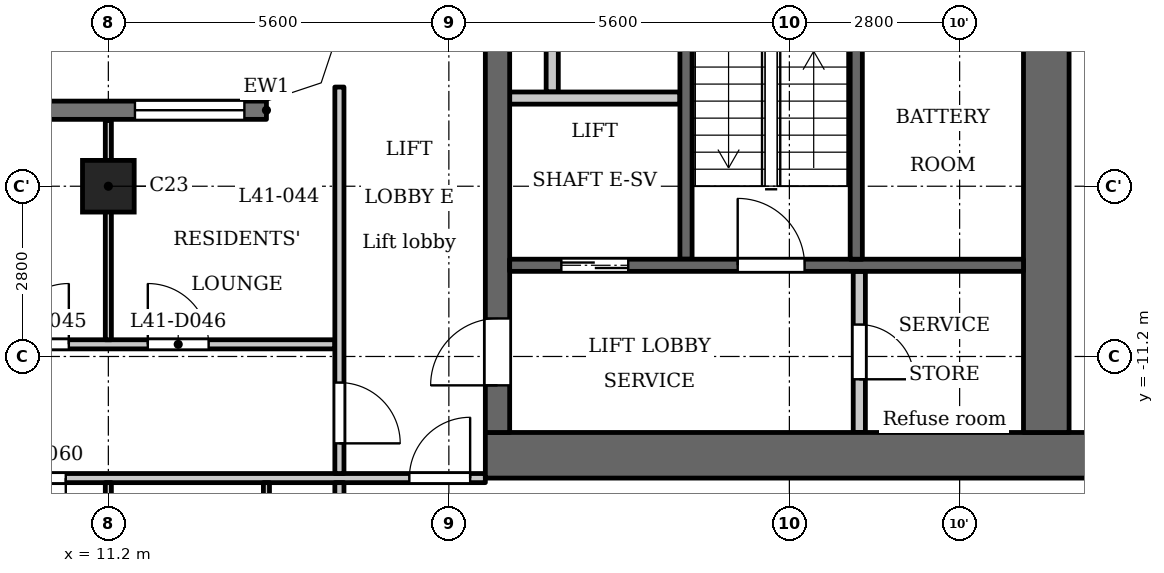
"""IFC4 building model, lengths in metres.
Left out: names, types, materials, properties, quantities, classifications, styles, units other than length and angle.
Written with IfcOpenShell. Run it as: python <this file> out.ifc"""

import sys

from ifc_helpers import new_model, si_unit, direction, frame, frame_2d, origin, origin_2d, place, context, subcontext, project, spatial, polyline, rectangle, outline, extrude, element, fill, save


model = new_model("IFC4")
c1 = context("Model", 3, precision=1e-05, world=origin(), true_north=direction((0.0, 1.0)))
c2 = subcontext(c1, "Body", "Model", "MODEL_VIEW")
j1 = project(units=[si_unit("LENGTHUNIT", "METRE"), si_unit("PLANEANGLEUNIT", "RADIAN")], contexts=[c1])
p1 = place(None, origin())
s1 = spatial("IfcSite", under=j1, at=p1, CompositionType="ELEMENT")
p2 = place(p1, origin())
s2 = spatial("IfcBuilding", under=s1, at=p2, CompositionType="ELEMENT")
p3 = place(p2, frame((0.0, 0.0, 160.6)))
s3 = spatial("IfcBuildingStorey", under=s2, at=p3, CompositionType="ELEMENT", Elevation=160.6)
p4 = place(p3, frame((11.2, -8.4, 0.0), z_axis=(0.0, 0.0, 1.0), x_axis=(1.0, 0.0, 0.0)))
e1 = element("IfcColumn", 1, at=p4, inside=s3, PredefinedType="COLUMN", context=c2, shape_type="SweptSolid", body=[
    extrude(rectangle(XDim=0.85, YDim=0.85, at=origin_2d()), origin(), (0.0, 0.0, 1.0), 3.5),
])
p5 = place(p3, frame((13.8, -7.15, 0.0), z_axis=(0.0, 0.0, 1.0), x_axis=(-1.0, 0.0, 0.0)))
e2 = element("IfcWall", 2, at=p5, inside=s3, PredefinedType="SOLIDWALL", context=c2, shape_type="SweptSolid", body=[
    extrude(rectangle(XDim=27.6, YDim=0.3, at=frame_2d((13.8, 0.0))), origin(), (0.0, 0.0, 1.0), 3.2),
])
p6 = place(p5, frame((0.363, 0.0, 0.9)))
e3 = element("IfcOpeningElement", 3, at=p6, cuts=e2, PredefinedType="OPENING", context=c2, shape_type="SweptSolid", body=[
    extrude(rectangle(XDim=1.8, YDim=1.25, at=frame_2d((0.9, 0.625))), frame((0.0, 0.16, 0.0), z_axis=(0.0, -1.0, 0.0), x_axis=(1.0, 0.0, 0.0)), (0.0, 0.0, 1.0), 0.32),
])
p7 = place(p5, frame((3.6, 0.0, 1.2)))
e4 = element("IfcOpeningElement", 4, at=p7, cuts=e2, PredefinedType="OPENING", context=c2, shape_type="SweptSolid", body=[
    extrude(rectangle(XDim=3.6, YDim=0.95, at=frame_2d((1.8, 0.475))), frame((0.0, 0.16, 0.0), z_axis=(0.0, -1.0, 0.0), x_axis=(1.0, 0.0, 0.0)), (0.0, 0.0, 1.0), 0.32),
])
p8 = place(p5, frame((9.2, 0.0, 1.2)))
e5 = element("IfcOpeningElement", 5, at=p8, cuts=e2, PredefinedType="OPENING", context=c2, shape_type="SweptSolid", body=[
    extrude(rectangle(XDim=3.6, YDim=0.95, at=frame_2d((1.8, 0.475))), frame((0.0, 0.16, 0.0), z_axis=(0.0, -1.0, 0.0), x_axis=(1.0, 0.0, 0.0)), (0.0, 0.0, 1.0), 0.32),
])
p9 = place(p5, frame((14.8, 0.0, 1.2)))
e6 = element("IfcOpeningElement", 6, at=p9, cuts=e2, PredefinedType="OPENING", context=c2, shape_type="SweptSolid", body=[
    extrude(rectangle(XDim=3.6, YDim=0.95, at=frame_2d((1.8, 0.475))), frame((0.0, 0.16, 0.0), z_axis=(0.0, -1.0, 0.0), x_axis=(1.0, 0.0, 0.0)), (0.0, 0.0, 1.0), 0.32),
])
p10 = place(p5, frame((20.4, 0.0, 1.2)))
e7 = element("IfcOpeningElement", 7, at=p10, cuts=e2, PredefinedType="OPENING", context=c2, shape_type="SweptSolid", body=[
    extrude(rectangle(XDim=3.6, YDim=0.95, at=frame_2d((1.8, 0.475))), frame((0.0, 0.16, 0.0), z_axis=(0.0, -1.0, 0.0), x_axis=(1.0, 0.0, 0.0)), (0.0, 0.0, 1.0), 0.32),
])
p11 = place(p5, frame((25.438, 0.0, 0.9)))
e8 = element("IfcOpeningElement", 8, at=p11, cuts=e2, PredefinedType="OPENING", context=c2, shape_type="SweptSolid", body=[
    extrude(rectangle(XDim=1.8, YDim=1.25, at=frame_2d((0.9, 0.625))), frame((0.0, 0.16, 0.0), z_axis=(0.0, -1.0, 0.0), x_axis=(1.0, 0.0, 0.0)), (0.0, 0.0, 1.0), 0.32),
])
p12 = place(p3, frame((20.7, -9.6, 0.0), z_axis=(0.0, 0.0, 1.0), x_axis=(0.0, 1.0, 0.0)))
e9 = element("IfcWall", 9, at=p12, inside=s3, PredefinedType="SHEAR", context=c2, shape_type="SweptSolid", body=[
    extrude(rectangle(XDim=9.75, YDim=0.2, at=frame_2d((4.875, 0.0))), origin(), (0.0, 0.0, 1.0), 3.2),
])
p13 = place(p3, frame((17.4, -12.825, 0.0), z_axis=(0.0, 0.0, 1.0), x_axis=(1.0, 0.0, 0.0)))
e10 = element("IfcWall", 10, at=p13, inside=s3, PredefinedType="SHEAR", context=c2, shape_type="SweptSolid", body=[
    extrude(rectangle(XDim=10.4, YDim=0.75, at=frame_2d((5.2, 0.0))), origin(), (0.0, 0.0, 1.0), 3.2),
])
p14 = place(p3, frame((18.5, -6.85, 0.0), z_axis=(0.0, 0.0, 1.0), x_axis=(0.0, 1.0, 0.0)))
e11 = element("IfcWall", 11, at=p14, inside=s3, PredefinedType="PARTITIONING", context=c2, shape_type="SweptSolid", body=[
    extrude(rectangle(XDim=7.0, YDim=0.2, at=frame_2d((3.5, 0.0))), origin(), (0.0, 0.0, 1.0), 3.2),
])
p15 = place(p3, frame((17.6, -12.45, 0.0), z_axis=(0.0, 0.0, 1.0), x_axis=(0.0, 1.0, 0.0)))
e12 = element("IfcWall", 12, at=p15, inside=s3, PredefinedType="SHEAR", context=c2, shape_type="SweptSolid", body=[
    extrude(rectangle(XDim=24.9, YDim=0.4, at=frame_2d((12.45, 0.0))), origin(), (0.0, 0.0, 1.0), 3.2),
])
p16 = place(p15, frame((8.65, 0.0, 0.0)))
e13 = element("IfcOpeningElement", 13, at=p16, cuts=e12, PredefinedType="OPENING", context=c2, shape_type="SweptSolid", body=[
    extrude(rectangle(XDim=0.9, YDim=2.1, at=frame_2d((0.45, 1.05))), frame((0.0, 0.21, 0.0), z_axis=(0.0, -1.0, 0.0), x_axis=(1.0, 0.0, 0.0)), (0.0, 0.0, 1.0), 0.42),
])
p17 = place(p15, frame((15.6, 0.0, 0.0)))
e14 = element("IfcOpeningElement", 14, at=p17, cuts=e12, PredefinedType="OPENING", context=c2, shape_type="SweptSolid", body=[
    extrude(rectangle(XDim=1.1, YDim=2.1, at=frame_2d((0.55, 1.05))), frame((0.0, 0.21, 0.0), z_axis=(0.0, -1.0, 0.0), x_axis=(1.0, 0.0, 0.0)), (0.0, 0.0, 1.0), 0.42),
])
p18 = place(p15, frame((18.0, 0.0, 0.0)))
e15 = element("IfcOpeningElement", 15, at=p18, cuts=e12, PredefinedType="OPENING", context=c2, shape_type="SweptSolid", body=[
    extrude(rectangle(XDim=1.1, YDim=2.1, at=frame_2d((0.55, 1.05))), frame((0.0, 0.21, 0.0), z_axis=(0.0, -1.0, 0.0), x_axis=(1.0, 0.0, 0.0)), (0.0, 0.0, 1.0), 0.42),
])
p19 = place(p15, frame((23.025, 0.0, 0.0)))
e16 = element("IfcOpeningElement", 16, at=p19, cuts=e12, PredefinedType="OPENING", context=c2, shape_type="SweptSolid", body=[
    extrude(rectangle(XDim=1.1, YDim=2.1, at=frame_2d((0.55, 1.05))), frame((0.0, 0.21, 0.0), z_axis=(0.0, -1.0, 0.0), x_axis=(1.0, 0.0, 0.0)), (0.0, 0.0, 1.0), 0.42),
])
p20 = place(p15, frame((0.775, 0.0, 0.0)))
e17 = element("IfcOpeningElement", 17, at=p20, cuts=e12, PredefinedType="OPENING", context=c2, shape_type="SweptSolid", body=[
    extrude(rectangle(XDim=1.1, YDim=2.1, at=frame_2d((0.55, 1.05))), frame((0.0, 0.21, 0.0), z_axis=(0.0, -1.0, 0.0), x_axis=(1.0, 0.0, 0.0)), (0.0, 0.0, 1.0), 0.42),
])
p21 = place(p15, frame((12.925, 0.0, 0.0)))
e18 = element("IfcOpeningElement", 18, at=p21, cuts=e12, PredefinedType="OPENING", context=c2, shape_type="SweptSolid", body=[
    extrude(rectangle(XDim=1.8, YDim=2.1, at=frame_2d((0.9, 1.05))), frame((0.0, 0.21, 0.0), z_axis=(0.0, -1.0, 0.0), x_axis=(1.0, 0.0, 0.0)), (0.0, 0.0, 1.0), 0.42),
])
p22 = place(p3, frame((26.625, -12.45, 0.0), z_axis=(0.0, 0.0, 1.0), x_axis=(0.0, 1.0, 0.0)))
e19 = element("IfcWall", 19, at=p22, inside=s3, PredefinedType="SHEAR", context=c2, shape_type="SweptSolid", body=[
    extrude(rectangle(XDim=24.9, YDim=0.75, at=frame_2d((12.45, 0.0))), origin(), (0.0, 0.0, 1.0), 3.2),
])
p23 = place(p3, frame((23.55, -12.45, 0.0), z_axis=(0.0, 0.0, 1.0), x_axis=(0.0, 1.0, 0.0)))
e20 = element("IfcWall", 20, at=p23, inside=s3, PredefinedType="PARTITIONING", context=c2, shape_type="SweptSolid", body=[
    extrude(rectangle(XDim=2.65, YDim=0.2, at=frame_2d((1.325, 0.0))), origin(), (0.0, 0.0, 1.0), 3.2),
])
p24 = place(p23, frame((0.875, 0.0, 0.0)))
e21 = element("IfcOpeningElement", 21, at=p24, cuts=e20, PredefinedType="OPENING", context=c2, shape_type="SweptSolid", body=[
    extrude(rectangle(XDim=0.9, YDim=2.1, at=frame_2d((0.45, 1.05))), frame((0.0, 0.11, 0.0), z_axis=(0.0, -1.0, 0.0), x_axis=(1.0, 0.0, 0.0)), (0.0, 0.0, 1.0), 0.22),
])
p25 = place(p3, frame((17.8, -9.7, 0.0), z_axis=(0.0, 0.0, 1.0), x_axis=(1.0, 0.0, 0.0)))
e22 = element("IfcWall", 22, at=p25, inside=s3, PredefinedType="SHEAR", context=c2, shape_type="SweptSolid", body=[
    extrude(rectangle(XDim=8.45, YDim=0.2, at=frame_2d((4.225, 0.0))), origin(), (0.0, 0.0, 1.0), 3.2),
])
p26 = place(p25, frame((0.85, 0.0, 0.0)))
e23 = element("IfcOpeningElement", 23, at=p26, cuts=e22, PredefinedType="OPENING", context=c2, shape_type="SweptSolid", body=[
    extrude(rectangle(XDim=1.1, YDim=2.1, at=frame_2d((0.55, 1.05))), frame((0.0, 0.11, 0.0), z_axis=(0.0, -1.0, 0.0), x_axis=(1.0, 0.0, 0.0)), (0.0, 0.0, 1.0), 0.22),
])
p27 = place(p25, frame((3.75, 0.0, 0.0)))
e24 = element("IfcOpeningElement", 24, at=p27, cuts=e22, PredefinedType="OPENING", context=c2, shape_type="SweptSolid", body=[
    extrude(rectangle(XDim=1.1, YDim=2.1, at=frame_2d((0.55, 1.05))), frame((0.0, 0.11, 0.0), z_axis=(0.0, -1.0, 0.0), x_axis=(1.0, 0.0, 0.0)), (0.0, 0.0, 1.0), 0.22),
])
p28 = place(p3, frame((17.8, -6.95, 0.0), z_axis=(0.0, 0.0, 1.0), x_axis=(1.0, 0.0, 0.0)))
e25 = element("IfcWall", 25, at=p28, inside=s3, PredefinedType="PARTITIONING", context=c2, shape_type="SweptSolid", body=[
    extrude(rectangle(XDim=2.8, YDim=0.2, at=frame_2d((1.4, 0.0))), origin(), (0.0, 0.0, 1.0), 3.2),
])
p29 = place(p3, frame((23.5, -9.6, 0.0), z_axis=(0.0, 0.0, 1.0), x_axis=(0.0, 1.0, 0.0)))
e26 = element("IfcWall", 26, at=p29, inside=s3, PredefinedType="SHEAR", context=c2, shape_type="SweptSolid", body=[
    extrude(rectangle(XDim=6.9, YDim=0.2, at=frame_2d((3.45, 0.0))), origin(), (0.0, 0.0, 1.0), 3.2),
])
p30 = place(p3, frame((-17.4, -13.2, 0.0), z_axis=(0.0, 0.0, 1.0), x_axis=(1.0, 0.0, 0.0)))
e27 = element("IfcWall", 27, at=p30, inside=s3, PredefinedType="PARTITIONING", context=c2, shape_type="SweptSolid", body=[
    extrude(rectangle(XDim=34.8, YDim=0.15, at=frame_2d((17.4, 0.0))), origin(), (0.0, 0.0, 1.0), 3.2),
])
p31 = place(p30, frame((0.15, 0.0, 0.0)))
e28 = element("IfcOpeningElement", 28, at=p31, cuts=e27, PredefinedType="OPENING", context=c2, shape_type="SweptSolid", body=[
    extrude(rectangle(XDim=1.0, YDim=2.1, at=frame_2d((0.5, 1.05))), frame((0.0, 0.085, 0.0), z_axis=(0.0, -1.0, 0.0), x_axis=(1.0, 0.0, 0.0)), (0.0, 0.0, 1.0), 0.17),
])
p32 = place(p30, frame((33.55, 0.0, 0.0)))
e29 = element("IfcOpeningElement", 29, at=p32, cuts=e27, PredefinedType="OPENING", context=c2, shape_type="SweptSolid", body=[
    extrude(rectangle(XDim=1.0, YDim=2.1, at=frame_2d((0.5, 1.05))), frame((0.0, 0.085, 0.0), z_axis=(0.0, -1.0, 0.0), x_axis=(1.0, 0.0, 0.0)), (0.0, 0.0, 1.0), 0.17),
])
p33 = place(p30, frame((3.5, 0.0, 0.0)))
e30 = element("IfcOpeningElement", 30, at=p33, cuts=e27, PredefinedType="OPENING", context=c2, shape_type="SweptSolid", body=[
    extrude(rectangle(XDim=1.0, YDim=2.1, at=frame_2d((0.5, 1.05))), frame((0.0, 0.085, 0.0), z_axis=(0.0, -1.0, 0.0), x_axis=(1.0, 0.0, 0.0)), (0.0, 0.0, 1.0), 0.17),
])
p34 = place(p30, frame((10.1, 0.0, 0.0)))
e31 = element("IfcOpeningElement", 31, at=p34, cuts=e27, PredefinedType="OPENING", context=c2, shape_type="SweptSolid", body=[
    extrude(rectangle(XDim=1.0, YDim=2.1, at=frame_2d((0.5, 1.05))), frame((0.0, 0.085, 0.0), z_axis=(0.0, -1.0, 0.0), x_axis=(1.0, 0.0, 0.0)), (0.0, 0.0, 1.0), 0.17),
])
p35 = place(p30, frame((15.7, 0.0, 0.0)))
e32 = element("IfcOpeningElement", 32, at=p35, cuts=e27, PredefinedType="OPENING", context=c2, shape_type="SweptSolid", body=[
    extrude(rectangle(XDim=1.0, YDim=2.1, at=frame_2d((0.5, 1.05))), frame((0.0, 0.085, 0.0), z_axis=(0.0, -1.0, 0.0), x_axis=(1.0, 0.0, 0.0)), (0.0, 0.0, 1.0), 0.17),
])
p36 = place(p30, frame((18.05, 0.0, 0.0)))
e33 = element("IfcOpeningElement", 33, at=p36, cuts=e27, PredefinedType="OPENING", context=c2, shape_type="SweptSolid", body=[
    extrude(rectangle(XDim=1.0, YDim=2.1, at=frame_2d((0.5, 1.05))), frame((0.0, 0.085, 0.0), z_axis=(0.0, -1.0, 0.0), x_axis=(1.0, 0.0, 0.0)), (0.0, 0.0, 1.0), 0.17),
])
p37 = place(p30, frame((26.9, 0.0, 0.0)))
e34 = element("IfcOpeningElement", 34, at=p37, cuts=e27, PredefinedType="OPENING", context=c2, shape_type="SweptSolid", body=[
    extrude(rectangle(XDim=1.0, YDim=2.1, at=frame_2d((0.5, 1.05))), frame((0.0, 0.085, 0.0), z_axis=(0.0, -1.0, 0.0), x_axis=(1.0, 0.0, 0.0)), (0.0, 0.0, 1.0), 0.17),
])
p38 = place(p3, frame((-14.925, -11.0, 0.0), z_axis=(0.0, 0.0, 1.0), x_axis=(1.0, 0.0, 0.0)))
e35 = element("IfcWall", 35, at=p38, inside=s3, PredefinedType="PARTITIONING", context=c2, shape_type="SweptSolid", body=[
    extrude(rectangle(XDim=29.85, YDim=0.15, at=frame_2d((14.925, 0.0))), origin(), (0.0, 0.0, 1.0), 3.2),
])
p39 = place(p38, frame((2.075, 0.0, 0.0)))
e36 = element("IfcOpeningElement", 36, at=p39, cuts=e35, PredefinedType="OPENING", context=c2, shape_type="SweptSolid", body=[
    extrude(rectangle(XDim=1.0, YDim=2.1, at=frame_2d((0.5, 1.05))), frame((0.0, 0.085, 0.0), z_axis=(0.0, -1.0, 0.0), x_axis=(1.0, 0.0, 0.0)), (0.0, 0.0, 1.0), 0.17),
])
p40 = place(p38, frame((4.425, 0.0, 0.0)))
e37 = element("IfcOpeningElement", 37, at=p40, cuts=e35, PredefinedType="OPENING", context=c2, shape_type="SweptSolid", body=[
    extrude(rectangle(XDim=1.0, YDim=2.1, at=frame_2d((0.5, 1.05))), frame((0.0, 0.085, 0.0), z_axis=(0.0, -1.0, 0.0), x_axis=(1.0, 0.0, 0.0)), (0.0, 0.0, 1.0), 0.17),
])
p41 = place(p38, frame((13.275, 0.0, 0.0)))
e38 = element("IfcOpeningElement", 38, at=p41, cuts=e35, PredefinedType="OPENING", context=c2, shape_type="SweptSolid", body=[
    extrude(rectangle(XDim=1.0, YDim=2.1, at=frame_2d((0.5, 1.05))), frame((0.0, 0.085, 0.0), z_axis=(0.0, -1.0, 0.0), x_axis=(1.0, 0.0, 0.0)), (0.0, 0.0, 1.0), 0.17),
])
p42 = place(p38, frame((15.625, 0.0, 0.0)))
e39 = element("IfcOpeningElement", 39, at=p42, cuts=e35, PredefinedType="OPENING", context=c2, shape_type="SweptSolid", body=[
    extrude(rectangle(XDim=1.0, YDim=2.1, at=frame_2d((0.5, 1.05))), frame((0.0, 0.085, 0.0), z_axis=(0.0, -1.0, 0.0), x_axis=(1.0, 0.0, 0.0)), (0.0, 0.0, 1.0), 0.17),
])
p43 = place(p38, frame((24.475, 0.0, 0.0)))
e40 = element("IfcOpeningElement", 40, at=p43, cuts=e35, PredefinedType="OPENING", context=c2, shape_type="SweptSolid", body=[
    extrude(rectangle(XDim=1.0, YDim=2.1, at=frame_2d((0.5, 1.05))), frame((0.0, 0.085, 0.0), z_axis=(0.0, -1.0, 0.0), x_axis=(1.0, 0.0, 0.0)), (0.0, 0.0, 1.0), 0.17),
])
p44 = place(p38, frame((26.774, 0.0, 0.0)))
e41 = element("IfcOpeningElement", 41, at=p44, cuts=e35, PredefinedType="OPENING", context=c2, shape_type="SweptSolid", body=[
    extrude(rectangle(XDim=1.0, YDim=2.1, at=frame_2d((0.5, 1.05))), frame((0.0, 0.085, 0.0), z_axis=(0.0, -1.0, 0.0), x_axis=(1.0, 0.0, 0.0)), (0.0, 0.0, 1.0), 0.17),
])
p45 = place(p3, frame((11.2, -17.05, 0.0), z_axis=(0.0, 0.0, 1.0), x_axis=(0.0, 1.0, 0.0)))
e42 = element("IfcWall", 42, at=p45, inside=s3, PredefinedType="PARTITIONING", context=c2, shape_type="SweptSolid", body=[
    extrude(rectangle(XDim=3.775, YDim=0.1, at=frame_2d((1.888, 0.0))), origin(), (0.0, 0.0, 1.0), 3.2),
])
p46 = place(p45, frame((0.1, 0.0, 0.0)))
e43 = element("IfcOpeningElement", 43, at=p46, cuts=e42, PredefinedType="OPENING", context=c2, shape_type="SweptSolid", body=[
    extrude(rectangle(XDim=0.9, YDim=2.1, at=frame_2d((0.45, 1.05))), frame((0.0, 0.06, 0.0), z_axis=(0.0, -1.0, 0.0), x_axis=(1.0, 0.0, 0.0)), (0.0, 0.0, 1.0), 0.12),
])
p47 = place(p3, frame((11.2, -10.925, 0.0), z_axis=(0.0, 0.0, 1.0), x_axis=(0.0, 1.0, 0.0)))
e44 = element("IfcWall", 44, at=p47, inside=s3, PredefinedType="PARTITIONING", context=c2, shape_type="SweptSolid", body=[
    extrude(rectangle(XDim=3.605, YDim=0.1, at=frame_2d((1.802, 0.0))), origin(), (0.0, 0.0, 1.0), 3.2),
])
p48 = place(p3, frame((13.8, -17.05, 0.0), z_axis=(0.0, 0.0, 1.0), x_axis=(0.0, 1.0, 0.0)))
e45 = element("IfcWall", 45, at=p48, inside=s3, PredefinedType="PARTITIONING", context=c2, shape_type="SweptSolid", body=[
    extrude(rectangle(XDim=3.775, YDim=0.1, at=frame_2d((1.888, 0.0))), origin(), (0.0, 0.0, 1.0), 3.2),
])
p49 = place(p3, frame((15.0, -15.325, 0.0), z_axis=(0.0, 0.0, 1.0), x_axis=(0.0, 1.0, 0.0)))
e46 = element("IfcWall", 46, at=p49, inside=s3, PredefinedType="PARTITIONING", context=c2, shape_type="SweptSolid", body=[
    extrude(rectangle(XDim=2.05, YDim=0.15, at=frame_2d((1.025, 0.0))), origin(), (0.0, 0.0, 1.0), 3.2),
])
p50 = place(p3, frame((15.0, -13.125, 0.0), z_axis=(0.0, 0.0, 1.0), x_axis=(0.0, 1.0, 0.0)))
e47 = element("IfcWall", 47, at=p50, inside=s3, PredefinedType="PARTITIONING", context=c2, shape_type="SweptSolid", body=[
    extrude(rectangle(XDim=6.356, YDim=0.15, at=frame_2d((3.178, 0.0))), origin(), (0.0, 0.0, 1.0), 3.2),
])
p51 = place(p50, frame((0.496, 0.0, 0.0)))
e48 = element("IfcOpeningElement", 48, at=p51, cuts=e47, PredefinedType="OPENING", context=c2, shape_type="SweptSolid", body=[
    extrude(rectangle(XDim=1.0, YDim=2.1, at=frame_2d((0.5, 1.05))), frame((0.0, 0.085, 0.0), z_axis=(0.0, -1.0, 0.0), x_axis=(1.0, 0.0, 0.0)), (0.0, 0.0, 1.0), 0.17),
])
p52 = place(p3, origin())
e49 = element("IfcWall", 49, at=p52, inside=s3, PredefinedType="SOLIDWALL", context=c2, shape_type="SweptSolid", body=[
    extrude(outline(polyline([(14.937, -6.937), (15.3, -5.849), (15.3, -5.8), (15.0, -5.8), (14.7, -6.7), (13.8, -7.0), (13.8, -7.3), (13.849, -7.3), (14.937, -6.937)])), origin(), (0.0, 0.0, 1.0), 3.2),
])
p53 = place(p26, origin())
e50 = element("IfcDoor", 50, at=p53, inside=s3, OperationType="DOUBLE_DOOR_SLIDING", PredefinedType="DOOR", context=c2, shape_type="SweptSolid", body=[
    extrude(rectangle(XDim=1.1, YDim=2.1, at=frame_2d((0.55, 1.05))), frame((0.0, 0.025, 0.0), z_axis=(0.0, -1.0, 0.0), x_axis=(1.0, 0.0, 0.0)), (0.0, 0.0, 1.0), 0.05),
])
fill(e23, e50)
p54 = place(p20, origin())
e51 = element("IfcDoor", 51, at=p54, inside=s3, OperationType="SINGLE_SWING_RIGHT", PredefinedType="DOOR", context=c2, shape_type="SweptSolid", body=[
    extrude(rectangle(XDim=1.1, YDim=2.1, at=frame_2d((0.55, 1.05))), frame((0.0, 0.025, 0.0), z_axis=(0.0, -1.0, 0.0), x_axis=(1.0, 0.0, 0.0)), (0.0, 0.0, 1.0), 0.05),
])
fill(e17, e51)
p55 = place(p24, origin())
e52 = element("IfcDoor", 52, at=p55, inside=s3, OperationType="SINGLE_SWING_LEFT", PredefinedType="DOOR", context=c2, shape_type="SweptSolid", body=[
    extrude(rectangle(XDim=0.9, YDim=2.1, at=frame_2d((0.45, 1.05))), frame((0.0, 0.025, 0.0), z_axis=(0.0, -1.0, 0.0), x_axis=(1.0, 0.0, 0.0)), (0.0, 0.0, 1.0), 0.05),
])
fill(e21, e52)
p56 = place(p27, origin())
e53 = element("IfcDoor", 53, at=p56, inside=s3, OperationType="SINGLE_SWING_RIGHT", PredefinedType="DOOR", context=c2, shape_type="SweptSolid", body=[
    extrude(rectangle(XDim=1.1, YDim=2.1, at=frame_2d((0.55, 1.05))), frame((0.0, 0.025, 0.0), z_axis=(0.0, -1.0, 0.0), x_axis=(1.0, 0.0, 0.0)), (0.0, 0.0, 1.0), 0.05),
])
fill(e24, e53)
p57 = place(p51, origin())
e54 = element("IfcDoor", 54, at=p57, inside=s3, OperationType="SINGLE_SWING_LEFT", PredefinedType="DOOR", context=c2, shape_type="SweptSolid", body=[
    extrude(rectangle(XDim=1.0, YDim=2.1, at=frame_2d((0.5, 1.05))), frame((0.0, 0.025, 0.0), z_axis=(0.0, -1.0, 0.0), x_axis=(1.0, 0.0, 0.0)), (0.0, 0.0, 1.0), 0.05),
])
fill(e48, e54)
p58 = place(p32, origin())
e55 = element("IfcDoor", 55, at=p58, inside=s3, OperationType="SINGLE_SWING_LEFT", PredefinedType="DOOR", context=c2, shape_type="SweptSolid", body=[
    extrude(rectangle(XDim=1.0, YDim=2.1, at=frame_2d((0.5, 1.05))), frame((0.0, 0.025, 0.0), z_axis=(0.0, -1.0, 0.0), x_axis=(1.0, 0.0, 0.0)), (0.0, 0.0, 1.0), 0.05),
])
fill(e29, e55)
p59 = place(p43, origin())
e56 = element("IfcDoor", 56, at=p59, inside=s3, OperationType="SINGLE_SWING_LEFT", PredefinedType="DOOR", context=c2, shape_type="SweptSolid", body=[
    extrude(rectangle(XDim=1.0, YDim=2.1, at=frame_2d((0.5, 1.05))), frame((0.0, 0.025, 0.0), z_axis=(0.0, -1.0, 0.0), x_axis=(1.0, 0.0, 0.0)), (0.0, 0.0, 1.0), 0.05),
])
fill(e40, e56)
p60 = place(p44, origin())
e57 = element("IfcDoor", 57, at=p60, inside=s3, OperationType="SINGLE_SWING_RIGHT", PredefinedType="DOOR", context=c2, shape_type="SweptSolid", body=[
    extrude(rectangle(XDim=1.0, YDim=2.1, at=frame_2d((0.5, 1.05))), frame((0.0, 0.025, 0.0), z_axis=(0.0, -1.0, 0.0), x_axis=(1.0, 0.0, 0.0)), (0.0, 0.0, 1.0), 0.05),
])
fill(e41, e57)
p61 = place(p37, origin())
e58 = element("IfcDoor", 58, at=p61, inside=s3, OperationType="SINGLE_SWING_RIGHT", PredefinedType="DOOR", context=c2, shape_type="SweptSolid", body=[
    extrude(rectangle(XDim=1.0, YDim=2.1, at=frame_2d((0.5, 1.05))), frame((0.0, 0.025, 0.0), z_axis=(0.0, -1.0, 0.0), x_axis=(1.0, 0.0, 0.0)), (0.0, 0.0, 1.0), 0.05),
])
fill(e34, e58)
p62 = place(p6, origin())
e59 = element("IfcWindow", 59, at=p62, inside=s3, PartitioningType="SINGLE_PANEL", PredefinedType="WINDOW", context=c2, shape_type="SweptSolid", body=[
    extrude(rectangle(XDim=1.8, YDim=1.25, at=frame_2d((0.9, 0.625))), frame((0.0, 0.03, 0.0), z_axis=(0.0, -1.0, 0.0), x_axis=(1.0, 0.0, 0.0)), (0.0, 0.0, 1.0), 0.06),
])
fill(e3, e59)
save(model, sys.argv[1])
